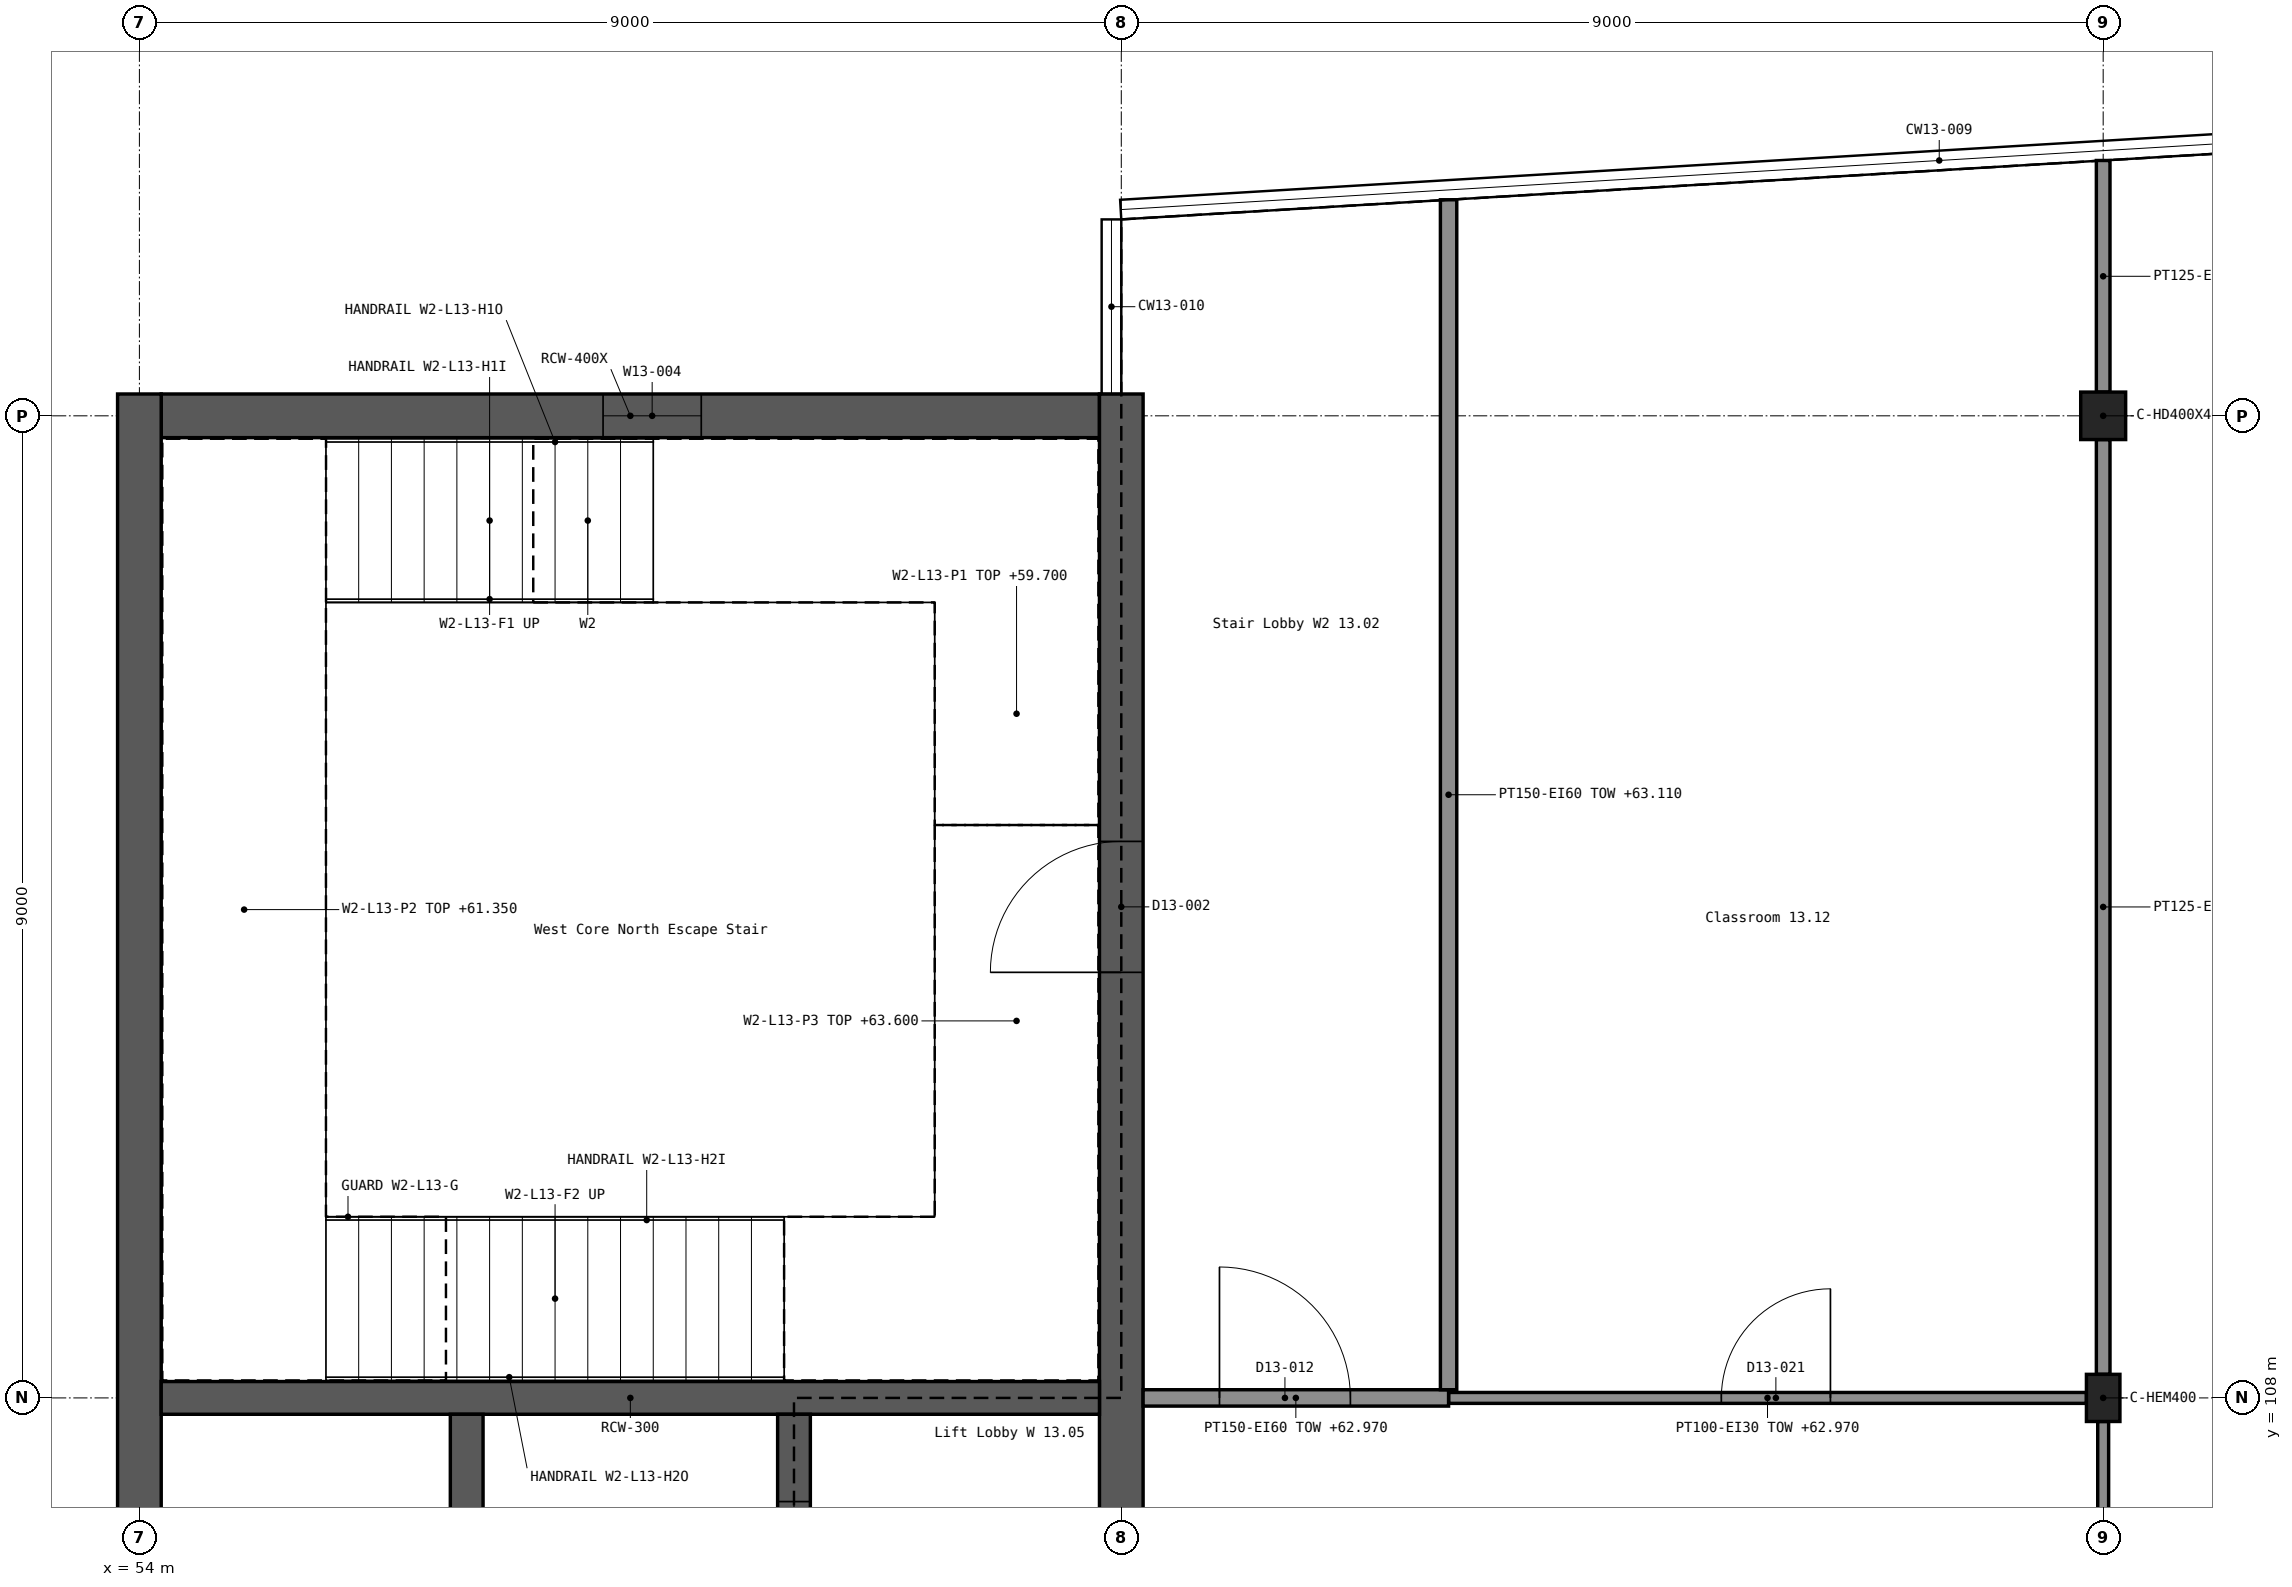
"""IFC4 building model, lengths in metres.
Left out: names, types, materials, properties, quantities, classifications, styles, units other than length and angle.
Written with IfcOpenShell. Run it as: python <this file> out.ifc"""

import sys

from ifc_helpers import new_model, si_unit, direction, frame, frame_2d, origin, origin_2d, place, context, subcontext, project, spatial, rectangle, i_section, extrude, element, fill, save


model = new_model("IFC4")
c1 = context("Model", 3, precision=1e-05, world=origin(), true_north=direction((0.0, 1.0)))
c2 = subcontext(c1, "Body", "Model", "MODEL_VIEW")
j1 = project(units=[si_unit("LENGTHUNIT", "METRE"), si_unit("PLANEANGLEUNIT", "RADIAN")], contexts=[c1])
p1 = place(None, origin())
s1 = spatial("IfcSite", under=j1, at=p1, CompositionType="ELEMENT")
p2 = place(p1, origin())
s2 = spatial("IfcBuilding", under=s1, at=p2, CompositionType="ELEMENT")
p3 = place(p2, frame((0.0, 0.0, 59.7)))
s3 = spatial("IfcBuildingStorey", under=s2, at=p3, CompositionType="ELEMENT", Elevation=59.7)
p4 = place(p3, frame((54.2, 117.0, 0.0), z_axis=(0.0, 0.0, 1.0), x_axis=(1.0, 0.0, 0.0)))
e1 = element("IfcWall", 1, at=p4, inside=s3, PredefinedType="SHEAR", context=c2, shape_type="SweptSolid", body=[
    extrude(rectangle(XDim=8.6, YDim=0.4, at=frame_2d((4.3, 0.0))), origin(), (0.0, 0.0, 1.0), 3.9),
])
p5 = place(p4, frame((4.05, 0.0, 1.2)))
e2 = element("IfcOpeningElement", 2, at=p5, cuts=e1, PredefinedType="OPENING", context=c2, shape_type="SweptSolid", body=[
    extrude(rectangle(XDim=0.9, YDim=1.5, at=frame_2d((0.45, 0.75))), frame((0.0, 0.211, 0.0), z_axis=(0.0, -1.0, 0.0), x_axis=(1.0, 0.0, 0.0)), (0.0, 0.0, 1.0), 0.422),
])
p6 = place(p3, frame((54.0, 89.8, 0.0), z_axis=(0.0, 0.0, 1.0), x_axis=(0.0, 1.0, 0.0)))
e3 = element("IfcWall", 3, at=p6, inside=s3, PredefinedType="SHEAR", context=c2, shape_type="SweptSolid", body=[
    extrude(rectangle(XDim=27.4, YDim=0.4, at=frame_2d((13.7, 0.0))), origin(), (0.0, 0.0, 1.0), 3.9),
])
p7 = place(p3, frame((63.0, 89.8, 0.0), z_axis=(0.0, 0.0, 1.0), x_axis=(0.0, 1.0, 0.0)))
e4 = element("IfcWall", 4, at=p7, inside=s3, PredefinedType="SHEAR", context=c2, shape_type="SweptSolid", body=[
    extrude(rectangle(XDim=27.4, YDim=0.4, at=frame_2d((13.7, 0.0))), origin(), (0.0, 0.0, 1.0), 3.9),
])
p8 = place(p7, frame((4.1, 0.0, 0.0)))
e5 = element("IfcOpeningElement", 5, at=p8, cuts=e4, PredefinedType="OPENING", context=c2, shape_type="SweptSolid", body=[
    extrude(rectangle(XDim=1.2, YDim=2.1, at=frame_2d((0.6, 1.05))), frame((0.0, 0.211, 0.0), z_axis=(0.0, -1.0, 0.0), x_axis=(1.0, 0.0, 0.0)), (0.0, 0.0, 1.0), 0.422),
])
p9 = place(p7, frame((22.1, 0.0, 0.0)))
e6 = element("IfcOpeningElement", 6, at=p9, cuts=e4, PredefinedType="OPENING", context=c2, shape_type="SweptSolid", body=[
    extrude(rectangle(XDim=1.2, YDim=2.1, at=frame_2d((0.6, 1.05))), frame((0.0, 0.211, 0.0), z_axis=(0.0, -1.0, 0.0), x_axis=(1.0, 0.0, 0.0)), (0.0, 0.0, 1.0), 0.422),
])
p10 = place(p7, frame((12.5, 0.0, 0.0)))
e7 = element("IfcOpeningElement", 7, at=p10, cuts=e4, PredefinedType="OPENING", context=c2, shape_type="SweptSolid", body=[
    extrude(rectangle(XDim=2.0, YDim=2.1, at=frame_2d((1.0, 1.05))), frame((0.0, 0.211, 0.0), z_axis=(0.0, -1.0, 0.0), x_axis=(1.0, 0.0, 0.0)), (0.0, 0.0, 1.0), 0.422),
])
p11 = place(p3, frame((54.2, 108.0, 0.0), z_axis=(0.0, 0.0, 1.0), x_axis=(1.0, 0.0, 0.0)))
e8 = element("IfcWall", 8, at=p11, inside=s3, PredefinedType="SHEAR", context=c2, shape_type="SweptSolid", body=[
    extrude(rectangle(XDim=8.6, YDim=0.3, at=frame_2d((4.3, 0.0))), origin(), (0.0, 0.0, 1.0), 3.9),
])
p12 = place(p3, frame((57.0, 99.15, 0.0), z_axis=(0.0, 0.0, 1.0), x_axis=(0.0, 1.0, 0.0)))
e9 = element("IfcWall", 9, at=p12, inside=s3, PredefinedType="SHEAR", context=c2, shape_type="SweptSolid", body=[
    extrude(rectangle(XDim=8.7, YDim=0.3, at=frame_2d((4.35, 0.0))), origin(), (0.0, 0.0, 1.0), 3.9),
])
p13 = place(p3, frame((60.0, 99.15, 0.0), z_axis=(0.0, 0.0, 1.0), x_axis=(0.0, 1.0, 0.0)))
e10 = element("IfcWall", 10, at=p13, inside=s3, PredefinedType="SHEAR", context=c2, shape_type="SweptSolid", body=[
    extrude(rectangle(XDim=8.7, YDim=0.3, at=frame_2d((4.35, 0.0))), origin(), (0.0, 0.0, 1.0), 3.9),
])
p14 = place(p13, frame((0.8, 0.0, 0.0)))
e11 = element("IfcOpeningElement", 11, at=p14, cuts=e10, PredefinedType="OPENING", context=c2, shape_type="SweptSolid", body=[
    extrude(rectangle(XDim=1.1, YDim=2.1, at=frame_2d((0.55, 1.05))), frame((0.0, 0.161, 0.0), z_axis=(0.0, -1.0, 0.0), x_axis=(1.0, 0.0, 0.0)), (0.0, 0.0, 1.0), 0.322),
])
p15 = place(p13, frame((3.8, 0.0, 0.0)))
e12 = element("IfcOpeningElement", 12, at=p15, cuts=e10, PredefinedType="OPENING", context=c2, shape_type="SweptSolid", body=[
    extrude(rectangle(XDim=1.1, YDim=2.1, at=frame_2d((0.55, 1.05))), frame((0.0, 0.161, 0.0), z_axis=(0.0, -1.0, 0.0), x_axis=(1.0, 0.0, 0.0)), (0.0, 0.0, 1.0), 0.322),
])
p16 = place(p13, frame((6.8, 0.0, 0.0)))
e13 = element("IfcOpeningElement", 13, at=p16, cuts=e10, PredefinedType="OPENING", context=c2, shape_type="SweptSolid", body=[
    extrude(rectangle(XDim=1.1, YDim=2.1, at=frame_2d((0.55, 1.05))), frame((0.0, 0.161, 0.0), z_axis=(0.0, -1.0, 0.0), x_axis=(1.0, 0.0, 0.0)), (0.0, 0.0, 1.0), 0.322),
])
p17 = place(p3, frame((72.0, 108.0, 0.0), z_axis=(0.0, 0.0, 1.0), x_axis=(1.0, 0.0, 0.0)))
e14 = element("IfcColumn", 14, at=p17, inside=s3, PredefinedType="COLUMN", context=c2, shape_type="SweptSolid", body=[
    extrude(i_section(OverallWidth=0.307, OverallDepth=0.432, WebThickness=0.021, FlangeThickness=0.04, FilletRadius=0.027, at=origin_2d()), origin(), (0.0, 0.0, 1.0), 3.9),
])
p18 = place(p3, frame((72.0, 117.0, 0.0), z_axis=(0.0, 0.0, 1.0), x_axis=(1.0, 0.0, 0.0)))
e15 = element("IfcColumn", 15, at=p18, inside=s3, PredefinedType="COLUMN", context=c2, shape_type="SweptSolid", body=[
    extrude(i_section(OverallWidth=0.412, OverallDepth=0.435, WebThickness=0.036, FlangeThickness=0.057, FilletRadius=0.015, at=origin_2d()), origin(), (0.0, 0.0, 1.0), 3.9),
])
p19 = place(p3, frame((66.0, 108.0, 0.0), z_axis=(0.0, 0.0, 1.0), x_axis=(1.0, 0.0, 0.0)))
e16 = element("IfcWall", 16, at=p19, inside=s3, PredefinedType="PARTITIONING", context=c2, shape_type="SweptSolid", body=[
    extrude(rectangle(XDim=5.846, YDim=0.1, at=frame_2d((2.923, 0.0))), origin(), (0.0, 0.0, 1.0), 3.27),
])
p20 = place(p19, frame((2.5, 0.0, 0.0)))
e17 = element("IfcOpeningElement", 17, at=p20, cuts=e16, PredefinedType="OPENING", context=c2, shape_type="SweptSolid", body=[
    extrude(rectangle(XDim=1.0, YDim=2.1, at=frame_2d((0.5, 1.05))), frame((0.0, 0.061, 0.0), z_axis=(0.0, -1.0, 0.0), x_axis=(1.0, 0.0, 0.0)), (0.0, 0.0, 1.0), 0.122),
])
p21 = place(p3, frame((63.2, 108.0, 0.0), z_axis=(0.0, 0.0, 1.0), x_axis=(1.0, 0.0, 0.0)))
e18 = element("IfcWall", 18, at=p21, inside=s3, PredefinedType="PARTITIONING", context=c2, shape_type="SweptSolid", body=[
    extrude(rectangle(XDim=2.8, YDim=0.15, at=frame_2d((1.4, 0.0))), origin(), (0.0, 0.0, 1.0), 3.27),
])
p22 = place(p21, frame((0.7, 0.0, 0.0)))
e19 = element("IfcOpeningElement", 19, at=p22, cuts=e18, PredefinedType="OPENING", context=c2, shape_type="SweptSolid", body=[
    extrude(rectangle(XDim=1.2, YDim=2.1, at=frame_2d((0.6, 1.05))), frame((0.0, 0.086, 0.0), z_axis=(0.0, -1.0, 0.0), x_axis=(1.0, 0.0, 0.0)), (0.0, 0.0, 1.0), 0.172),
])
p23 = place(p3, frame((66.0, 108.075, 0.0), z_axis=(0.0, 0.0, 1.0), x_axis=(0.0, 1.0, 0.0)))
e20 = element("IfcWall", 20, at=p23, inside=s3, PredefinedType="PARTITIONING", context=c2, shape_type="SweptSolid", body=[
    extrude(rectangle(XDim=10.905, YDim=0.15, at=frame_2d((5.453, 0.0))), origin(), (0.0, 0.0, 1.0), 3.41),
])
p24 = place(p3, frame((72.0, 99.216, 0.0), z_axis=(0.0, 0.0, 1.0), x_axis=(0.0, 1.0, 0.0)))
e21 = element("IfcWall", 21, at=p24, inside=s3, PredefinedType="PARTITIONING", context=c2, shape_type="SweptSolid", body=[
    extrude(rectangle(XDim=8.568, YDim=0.1, at=frame_2d((4.284, 0.0))), origin(), (0.0, 0.0, 1.0), 3.37),
])
p25 = place(p24, frame((3.384, 0.0, 0.0)))
e22 = element("IfcOpeningElement", 22, at=p25, cuts=e21, PredefinedType="OPENING", context=c2, shape_type="SweptSolid", body=[
    extrude(rectangle(XDim=1.8, YDim=2.4, at=frame_2d((0.9, 1.2))), frame((0.0, 0.061, 0.0), z_axis=(0.0, -1.0, 0.0), x_axis=(1.0, 0.0, 0.0)), (0.0, 0.0, 1.0), 0.122),
])
p26 = place(p3, frame((72.0, 108.216, 0.0), z_axis=(0.0, 0.0, 1.0), x_axis=(0.0, 1.0, 0.0)))
e23 = element("IfcWall", 23, at=p26, inside=s3, PredefinedType="PARTITIONING", context=c2, shape_type="SweptSolid", body=[
    extrude(rectangle(XDim=8.566, YDim=0.125, at=frame_2d((4.283, 0.0))), origin(), (0.0, 0.0, 1.0), 3.37),
])
p27 = place(p3, frame((72.0, 117.218, 0.0), z_axis=(0.0, 0.0, 1.0), x_axis=(0.0, 1.0, 0.0)))
e24 = element("IfcWall", 24, at=p27, inside=s3, PredefinedType="PARTITIONING", context=c2, shape_type="SweptSolid", body=[
    extrude(rectangle(XDim=2.123, YDim=0.125, at=frame_2d((1.061, 0.0))), origin(), (0.0, 0.0, 1.0), 3.41),
])
p28 = place(p5, origin())
e25 = element("IfcWindow", 25, at=p28, inside=s3, PartitioningType="SINGLE_PANEL", PredefinedType="WINDOW", context=c2, shape_type="SweptSolid", body=[
    extrude(rectangle(XDim=0.9, YDim=1.5, at=frame_2d((0.45, 0.75))), frame((0.0, 0.03, 0.0), z_axis=(0.0, -1.0, 0.0), x_axis=(1.0, 0.0, 0.0)), (0.0, 0.0, 1.0), 0.06),
])
fill(e2, e25)
p29 = place(p9, origin())
e26 = element("IfcDoor", 26, at=p29, inside=s3, OperationType="SINGLE_SWING_LEFT", PredefinedType="DOOR", context=c2, shape_type="SweptSolid", body=[
    extrude(rectangle(XDim=1.2, YDim=2.1, at=frame_2d((0.6, 1.05))), frame((0.0, 0.025, 0.0), z_axis=(0.0, -1.0, 0.0), x_axis=(1.0, 0.0, 0.0)), (0.0, 0.0, 1.0), 0.05),
])
fill(e6, e26)
p30 = place(p16, origin())
e27 = element("IfcDoor", 27, at=p30, inside=s3, OperationType="DOUBLE_DOOR_SLIDING", PredefinedType="DOOR", context=c2, shape_type="SweptSolid", body=[
    extrude(rectangle(XDim=1.1, YDim=2.1, at=frame_2d((0.55, 1.05))), frame((0.0, 0.025, 0.0), z_axis=(0.0, -1.0, 0.0), x_axis=(1.0, 0.0, 0.0)), (0.0, 0.0, 1.0), 0.05),
])
fill(e13, e27)
p31 = place(p22, origin())
e28 = element("IfcDoor", 28, at=p31, inside=s3, OperationType="SINGLE_SWING_LEFT", PredefinedType="DOOR", context=c2, shape_type="SweptSolid", body=[
    extrude(rectangle(XDim=1.2, YDim=2.1, at=frame_2d((0.6, 1.05))), frame((0.0, 0.025, 0.0), z_axis=(0.0, -1.0, 0.0), x_axis=(1.0, 0.0, 0.0)), (0.0, 0.0, 1.0), 0.05),
])
fill(e19, e28)
p32 = place(p20, origin())
e29 = element("IfcDoor", 29, at=p32, inside=s3, OperationType="SINGLE_SWING_RIGHT", PredefinedType="DOOR", context=c2, shape_type="SweptSolid", body=[
    extrude(rectangle(XDim=1.0, YDim=2.1, at=frame_2d((0.5, 1.05))), frame((0.0, 0.025, 0.0), z_axis=(0.0, -1.0, 0.0), x_axis=(1.0, 0.0, 0.0)), (0.0, 0.0, 1.0), 0.05),
])
fill(e17, e29)
save(model, sys.argv[1])
